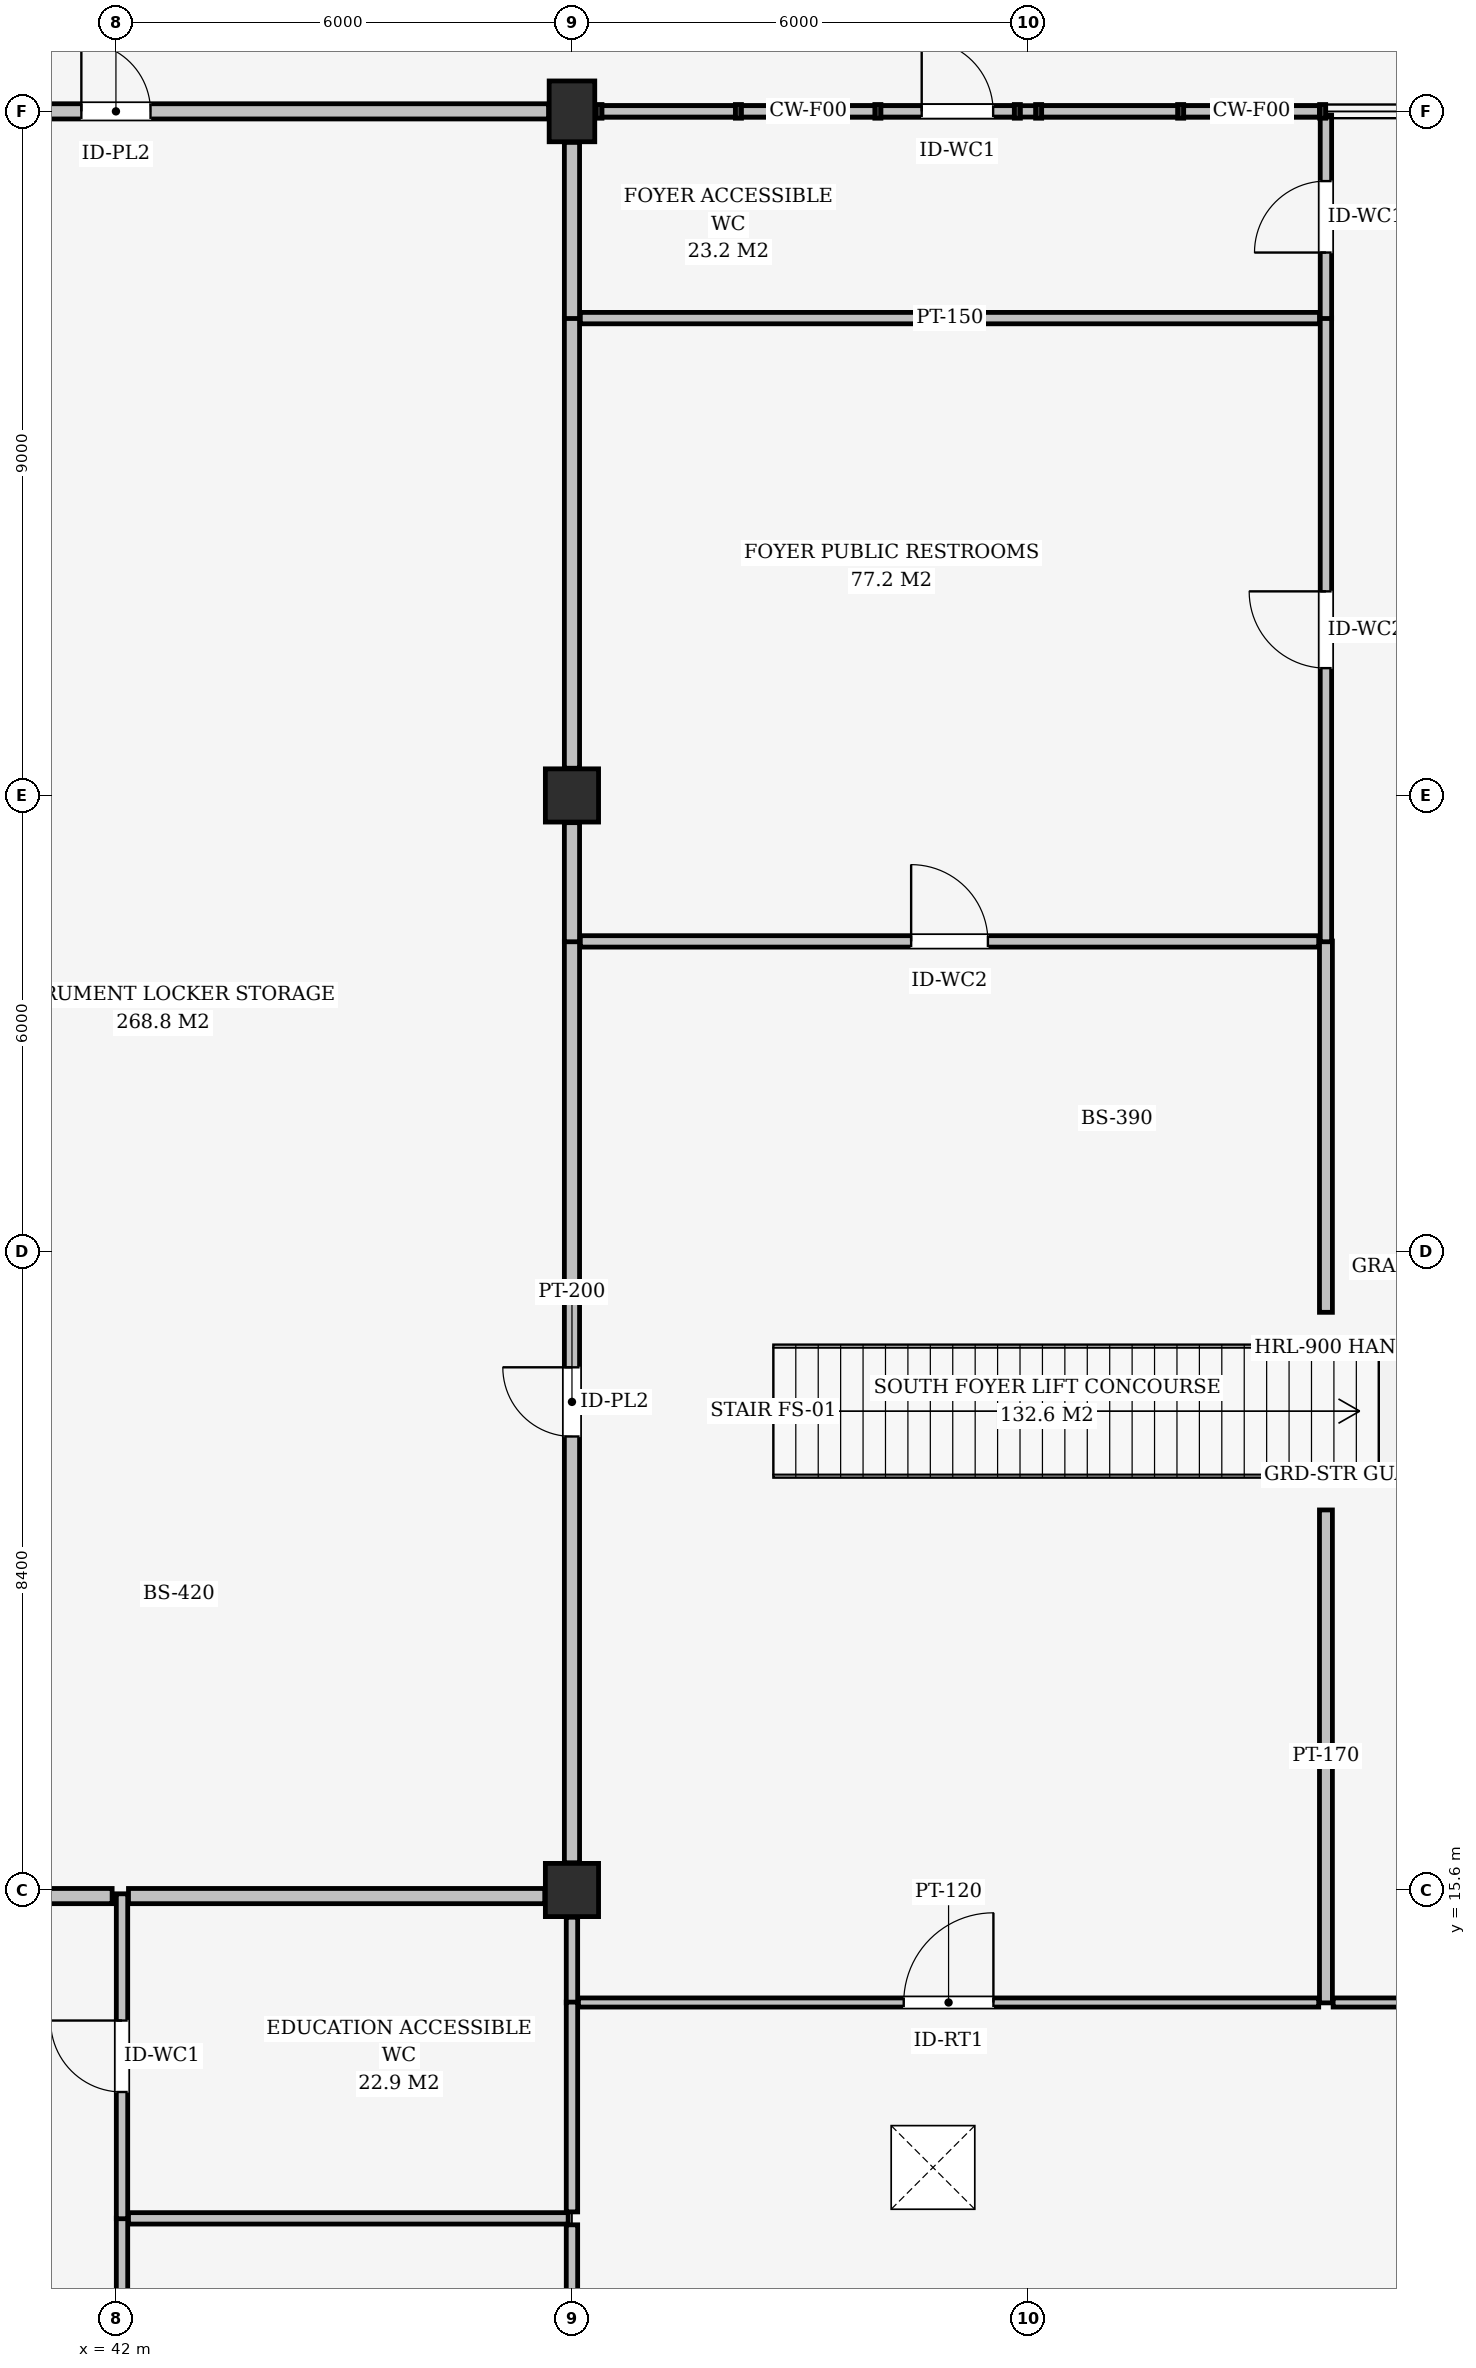
"""IFC4 building model, lengths in metres.
Left out: names, types, materials, properties, quantities, classifications, styles, units other than length and angle.
Written with IfcOpenShell. Run it as: python <this file> out.ifc"""

import sys

from ifc_helpers import new_model, si_unit, direction, frame, frame_2d, origin, origin_2d, place, context, subcontext, project, spatial, rectangle, extrude, element, fill, save


model = new_model("IFC4")
c1 = context("Model", 3, precision=1e-05, world=origin(), true_north=direction((0.0, 1.0)))
c2 = subcontext(c1, "Body", "Model", "MODEL_VIEW")
j1 = project(units=[si_unit("LENGTHUNIT", "METRE"), si_unit("PLANEANGLEUNIT", "RADIAN")], contexts=[c1])
p1 = place(None, origin())
s1 = spatial("IfcSite", under=j1, at=p1, CompositionType="ELEMENT")
p2 = place(p1, origin())
s2 = spatial("IfcBuilding", under=s1, at=p2, CompositionType="ELEMENT")
p3 = place(p2, origin())
s3 = spatial("IfcBuildingStorey", under=s2, at=p3, CompositionType="ELEMENT", Elevation=0.0)
p4 = place(p3, frame((48.0, 39.0, 0.0), z_axis=(0.0, 0.0, 1.0), x_axis=(1.0, 0.0, 0.0)))
e1 = element("IfcColumn", 1, at=p4, inside=s3, PredefinedType="COLUMN", context=c2, shape_type="SweptSolid", body=[
    extrude(rectangle(XDim=0.6, YDim=0.8, at=origin_2d()), origin(), (0.0, 0.0, 1.0), 4.8),
])
for number, where, z_axis, x_axis in (
    (2, (48.0, 15.6, 0.0), (0.0, 0.0, 1.0), (1.0, 0.0, 0.0)),
    (3, (48.0, 30.0, 0.0), (0.0, 0.0, 1.0), (1.0, 0.0, 0.0)),
):
    element("IfcColumn", number, at=place(p3, frame(where, z_axis=z_axis, x_axis=x_axis)), inside=s3, PredefinedType="COLUMN", context=c2, shape_type="SweptSolid", body=[
        extrude(rectangle(XDim=0.7, YDim=0.7, at=origin_2d()), origin(), (0.0, 0.0, 1.0), 4.8),
    ])
p5 = place(p3, frame((42.08, 0.05, 0.0), z_axis=(0.0, 0.0, 1.0), x_axis=(0.0, 1.0, 0.0)))
e4 = element("IfcWall", 4, at=p5, inside=s3, PredefinedType="PARTITIONING", context=c2, shape_type="SweptSolid", body=[
    extrude(rectangle(XDim=11.235, YDim=0.15, at=frame_2d((5.617, 0.0))), origin(), (0.0, 0.0, 1.0), 3.986),
])
p6 = place(p5, frame((6.596, 0.0, 0.0)))
e5 = element("IfcOpeningElement", 5, at=p6, cuts=e4, PredefinedType="OPENING", context=c2, shape_type="SweptSolid", body=[
    extrude(rectangle(XDim=1.01, YDim=2.1, at=frame_2d((0.505, 1.05))), frame((0.0, 0.085, 0.0), z_axis=(0.0, -1.0, 0.0), x_axis=(1.0, 0.0, 0.0)), (0.0, 0.0, 1.0), 0.17),
])
p7 = place(p3, frame((42.08, 11.275, 0.0), z_axis=(0.0, 0.0, 1.0), x_axis=(0.0, 1.0, 0.0)))
e6 = element("IfcWall", 6, at=p7, inside=s3, PredefinedType="PARTITIONING", context=c2, shape_type="SweptSolid", body=[
    extrude(rectangle(XDim=4.275, YDim=0.15, at=frame_2d((2.138, 0.0))), origin(), (0.0, 0.0, 1.0), 3.986),
])
p8 = place(p7, frame((1.667, 0.0, 0.0)))
e7 = element("IfcOpeningElement", 7, at=p8, cuts=e6, PredefinedType="OPENING", context=c2, shape_type="SweptSolid", body=[
    extrude(rectangle(XDim=0.94, YDim=2.1, at=frame_2d((0.47, 1.05))), frame((0.0, 0.085, 0.0), z_axis=(0.0, -1.0, 0.0), x_axis=(1.0, 0.0, 0.0)), (0.0, 0.0, 1.0), 0.17),
])
p9 = place(p3, frame((36.358, 15.52, 0.0), z_axis=(0.0, 0.0, 1.0), x_axis=(1.0, 0.0, 0.0)))
e8 = element("IfcWall", 8, at=p9, inside=s3, PredefinedType="PARTITIONING", context=c2, shape_type="SweptSolid", body=[
    extrude(rectangle(XDim=5.592, YDim=0.2, at=frame_2d((2.796, 0.0))), origin(), (0.0, 0.0, 1.0), 3.73),
])
p10 = place(p9, frame((2.341, 0.0, 0.0)))
e9 = element("IfcOpeningElement", 9, at=p10, cuts=e8, PredefinedType="OPENING", context=c2, shape_type="SweptSolid", body=[
    extrude(rectangle(XDim=0.91, YDim=2.1, at=frame_2d((0.455, 1.05))), frame((0.0, 0.11, 0.0), z_axis=(0.0, -1.0, 0.0), x_axis=(1.0, 0.0, 0.0)), (0.0, 0.0, 1.0), 0.22),
])
p11 = place(p3, frame((42.165, 11.28, 0.0), z_axis=(0.0, 0.0, 1.0), x_axis=(1.0, 0.0, 0.0)))
e10 = element("IfcWall", 10, at=p11, inside=s3, PredefinedType="PARTITIONING", context=c2, shape_type="SweptSolid", body=[
    extrude(rectangle(XDim=5.785, YDim=0.15, at=frame_2d((2.893, 0.0))), origin(), (0.0, 0.0, 1.0), 4.53),
])
p12 = place(p3, frame((48.0, 7.25, 0.0), z_axis=(0.0, 0.0, 1.0), x_axis=(0.0, 1.0, 0.0)))
e11 = element("IfcWall", 11, at=p12, inside=s3, PredefinedType="PARTITIONING", context=c2, shape_type="SweptSolid", body=[
    extrude(rectangle(XDim=3.945, YDim=0.15, at=frame_2d((1.973, 0.0))), origin(), (0.0, 0.0, 1.0), 3.684),
])
p13 = place(p3, frame((42.165, 15.52, 0.0), z_axis=(0.0, 0.0, 1.0), x_axis=(1.0, 0.0, 0.0)))
e12 = element("IfcWall", 12, at=p13, inside=s3, PredefinedType="PARTITIONING", context=c2, shape_type="SweptSolid", body=[
    extrude(rectangle(XDim=5.477, YDim=0.2, at=frame_2d((2.739, 0.0))), origin(), (0.0, 0.0, 1.0), 3.73),
])
p14 = place(p3, frame((48.0, 14.115, 0.0), z_axis=(0.0, 0.0, 1.0), x_axis=(0.0, 1.0, 0.0)))
e13 = element("IfcWall", 13, at=p14, inside=s3, PredefinedType="PARTITIONING", context=c2, shape_type="SweptSolid", body=[
    extrude(rectangle(XDim=1.127, YDim=0.15, at=frame_2d((0.563, 0.0))), origin(), (0.0, 0.0, 1.0), 3.684),
])
p15 = place(p3, frame((48.0, 11.365, 0.0), z_axis=(0.0, 0.0, 1.0), x_axis=(0.0, 1.0, 0.0)))
e14 = element("IfcWall", 14, at=p15, inside=s3, PredefinedType="PARTITIONING", context=c2, shape_type="SweptSolid", body=[
    extrude(rectangle(XDim=2.76, YDim=0.15, at=frame_2d((1.38, 0.0))), origin(), (0.0, 0.0, 1.0), 3.684),
])
p16 = place(p3, frame((48.0, 15.958, 0.0), z_axis=(0.0, 0.0, 1.0), x_axis=(0.0, 1.0, 0.0)))
e15 = element("IfcWall", 15, at=p16, inside=s3, PredefinedType="PARTITIONING", context=c2, shape_type="SweptSolid", body=[
    extrude(rectangle(XDim=12.127, YDim=0.2, at=frame_2d((6.063, 0.0))), origin(), (0.0, 0.0, 1.0), 3.919),
])
p17 = place(p16, frame((5.608, 0.0, 0.0)))
e16 = element("IfcOpeningElement", 16, at=p17, cuts=e15, PredefinedType="OPENING", context=c2, shape_type="SweptSolid", body=[
    extrude(rectangle(XDim=0.91, YDim=2.1, at=frame_2d((0.455, 1.05))), frame((0.0, 0.11, 0.0), z_axis=(0.0, -1.0, 0.0), x_axis=(1.0, 0.0, 0.0)), (0.0, 0.0, 1.0), 0.22),
])
p18 = place(p3, frame((48.0, 28.075, 0.0), z_axis=(0.0, 0.0, 1.0), x_axis=(0.0, 1.0, 0.0)))
e17 = element("IfcWall", 17, at=p18, inside=s3, PredefinedType="PARTITIONING", context=c2, shape_type="SweptSolid", body=[
    extrude(rectangle(XDim=1.567, YDim=0.2, at=frame_2d((0.784, 0.0))), origin(), (0.0, 0.0, 1.0), 3.919),
])
p19 = place(p3, frame((48.0, 30.358, 0.0), z_axis=(0.0, 0.0, 1.0), x_axis=(0.0, 1.0, 0.0)))
e18 = element("IfcWall", 18, at=p19, inside=s3, PredefinedType="PARTITIONING", context=c2, shape_type="SweptSolid", body=[
    extrude(rectangle(XDim=5.927, YDim=0.2, at=frame_2d((2.963, 0.0))), origin(), (0.0, 0.0, 1.0), 3.919),
])
p20 = place(p3, frame((48.0, 36.275, 0.0), z_axis=(0.0, 0.0, 1.0), x_axis=(0.0, 1.0, 0.0)))
e19 = element("IfcWall", 19, at=p20, inside=s3, PredefinedType="PARTITIONING", context=c2, shape_type="SweptSolid", body=[
    extrude(rectangle(XDim=2.317, YDim=0.2, at=frame_2d((1.159, 0.0))), origin(), (0.0, 0.0, 1.0), 3.919),
])
p21 = place(p3, frame((36.308, 39.0, 0.0), z_axis=(0.0, 0.0, 1.0), x_axis=(1.0, 0.0, 0.0)))
e20 = element("IfcWall", 20, at=p21, inside=s3, PredefinedType="PARTITIONING", context=c2, shape_type="SweptSolid", body=[
    extrude(rectangle(XDim=11.384, YDim=0.2, at=frame_2d((5.692, 0.0))), origin(), (0.0, 0.0, 1.0), 3.73),
])
p22 = place(p21, frame((5.237, 0.0, 0.0)))
e21 = element("IfcOpeningElement", 21, at=p22, cuts=e20, PredefinedType="OPENING", context=c2, shape_type="SweptSolid", body=[
    extrude(rectangle(XDim=0.91, YDim=2.1, at=frame_2d((0.455, 1.05))), frame((0.0, 0.11, 0.0), z_axis=(0.0, -1.0, 0.0), x_axis=(1.0, 0.0, 0.0)), (0.0, 0.0, 1.0), 0.22),
])
p23 = place(p3, frame((57.92, 14.115, 0.0), z_axis=(0.0, 0.0, 1.0), x_axis=(0.0, 1.0, 0.0)))
e22 = element("IfcWall", 22, at=p23, inside=s3, PredefinedType="PARTITIONING", context=c2, shape_type="SweptSolid", body=[
    extrude(rectangle(XDim=6.485, YDim=0.17, at=frame_2d((3.243, 0.0))), origin(), (0.0, 0.0, 1.0), 3.986),
])
p24 = place(p3, frame((57.92, 23.2, 0.0), z_axis=(0.0, 0.0, 1.0), x_axis=(0.0, 1.0, 0.0)))
e23 = element("IfcWall", 23, at=p24, inside=s3, PredefinedType="PARTITIONING", context=c2, shape_type="SweptSolid", body=[
    extrude(rectangle(XDim=4.885, YDim=0.17, at=frame_2d((2.442, 0.0))), origin(), (0.0, 0.0, 1.0), 4.53),
])
p25 = place(p3, frame((58.015, 14.12, 0.0), z_axis=(0.0, 0.0, 1.0), x_axis=(1.0, 0.0, 0.0)))
e24 = element("IfcWall", 24, at=p25, inside=s3, PredefinedType="PARTITIONING", context=c2, shape_type="SweptSolid", body=[
    extrude(rectangle(XDim=7.91, YDim=0.12, at=frame_2d((3.955, 0.0))), origin(), (0.0, 0.0, 1.0), 4.53),
])
p26 = place(p25, frame((3.365, 0.0, 0.0)))
e25 = element("IfcOpeningElement", 25, at=p26, cuts=e24, PredefinedType="OPENING", context=c2, shape_type="SweptSolid", body=[
    extrude(rectangle(XDim=1.18, YDim=2.2, at=frame_2d((0.59, 1.1))), frame((0.0, 0.07, 0.0), z_axis=(0.0, -1.0, 0.0), x_axis=(1.0, 0.0, 0.0)), (0.0, 0.0, 1.0), 0.14),
])
p27 = place(p3, frame((57.92, 28.075, 0.0), z_axis=(0.0, 0.0, 1.0), x_axis=(0.0, 1.0, 0.0)))
e26 = element("IfcWall", 26, at=p27, inside=s3, PredefinedType="PARTITIONING", context=c2, shape_type="SweptSolid", body=[
    extrude(rectangle(XDim=8.21, YDim=0.15, at=frame_2d((4.105, 0.0))), origin(), (0.0, 0.0, 1.0), 4.075),
])
p28 = place(p27, frame((3.6, 0.0, 0.0)))
e27 = element("IfcOpeningElement", 27, at=p28, cuts=e26, PredefinedType="OPENING", context=c2, shape_type="SweptSolid", body=[
    extrude(rectangle(XDim=1.01, YDim=2.1, at=frame_2d((0.505, 1.05))), frame((0.0, 0.085, 0.0), z_axis=(0.0, -1.0, 0.0), x_axis=(1.0, 0.0, 0.0)), (0.0, 0.0, 1.0), 0.17),
])
p29 = place(p3, frame((57.92, 36.275, 0.0), z_axis=(0.0, 0.0, 1.0), x_axis=(0.0, 1.0, 0.0)))
e28 = element("IfcWall", 28, at=p29, inside=s3, PredefinedType="PARTITIONING", context=c2, shape_type="SweptSolid", body=[
    extrude(rectangle(XDim=2.675, YDim=0.15, at=frame_2d((1.337, 0.0))), origin(), (0.0, 0.0, 1.0), 4.075),
])
p30 = place(p29, frame((0.867, 0.0, 0.0)))
e29 = element("IfcOpeningElement", 29, at=p30, cuts=e28, PredefinedType="OPENING", context=c2, shape_type="SweptSolid", body=[
    extrude(rectangle(XDim=0.94, YDim=2.1, at=frame_2d((0.47, 1.05))), frame((0.0, 0.085, 0.0), z_axis=(0.0, -1.0, 0.0), x_axis=(1.0, 0.0, 0.0)), (0.0, 0.0, 1.0), 0.17),
])
p31 = place(p3, frame((48.085, 14.12, 0.0), z_axis=(0.0, 0.0, 1.0), x_axis=(1.0, 0.0, 0.0)))
e30 = element("IfcWall", 30, at=p31, inside=s3, PredefinedType="PARTITIONING", context=c2, shape_type="SweptSolid", body=[
    extrude(rectangle(XDim=9.74, YDim=0.12, at=frame_2d((4.87, 0.0))), origin(), (0.0, 0.0, 1.0), 4.53),
])
p32 = place(p31, frame((4.28, 0.0, 0.0)))
e31 = element("IfcOpeningElement", 31, at=p32, cuts=e30, PredefinedType="OPENING", context=c2, shape_type="SweptSolid", body=[
    extrude(rectangle(XDim=1.18, YDim=2.2, at=frame_2d((0.59, 1.1))), frame((0.0, 0.07, 0.0), z_axis=(0.0, -1.0, 0.0), x_axis=(1.0, 0.0, 0.0)), (0.0, 0.0, 1.0), 0.14),
])
p33 = place(p3, frame((48.11, 28.08, 0.0), z_axis=(0.0, 0.0, 1.0), x_axis=(1.0, 0.0, 0.0)))
e32 = element("IfcWall", 32, at=p33, inside=s3, PredefinedType="PARTITIONING", context=c2, shape_type="SweptSolid", body=[
    extrude(rectangle(XDim=9.715, YDim=0.15, at=frame_2d((4.857, 0.0))), origin(), (0.0, 0.0, 1.0), 4.53),
])
p34 = place(p33, frame((4.353, 0.0, 0.0)))
e33 = element("IfcOpeningElement", 33, at=p34, cuts=e32, PredefinedType="OPENING", context=c2, shape_type="SweptSolid", body=[
    extrude(rectangle(XDim=1.01, YDim=2.1, at=frame_2d((0.505, 1.05))), frame((0.0, 0.085, 0.0), z_axis=(0.0, -1.0, 0.0), x_axis=(1.0, 0.0, 0.0)), (0.0, 0.0, 1.0), 0.17),
])
p35 = place(p3, frame((48.11, 36.28, 0.0), z_axis=(0.0, 0.0, 1.0), x_axis=(1.0, 0.0, 0.0)))
e34 = element("IfcWall", 34, at=p35, inside=s3, PredefinedType="PARTITIONING", context=c2, shape_type="SweptSolid", body=[
    extrude(rectangle(XDim=9.725, YDim=0.15, at=frame_2d((4.862, 0.0))), origin(), (0.0, 0.0, 1.0), 4.53),
])
p36 = place(p3, frame((48.308, 39.0, 0.0), z_axis=(0.0, 0.0, 1.0), x_axis=(1.0, 0.0, 0.0)))
e35 = element("IfcWall", 35, at=p36, inside=s3, PredefinedType="PARTITIONING", context=c2, shape_type="SweptSolid", body=[
    extrude(rectangle(XDim=9.527, YDim=0.15, at=frame_2d((4.763, 0.0))), origin(), (0.0, 0.0, 1.0), 3.73),
])
p37 = place(p36, frame((4.293, 0.0, 0.0)))
e36 = element("IfcOpeningElement", 36, at=p37, cuts=e35, PredefinedType="OPENING", context=c2, shape_type="SweptSolid", body=[
    extrude(rectangle(XDim=0.94, YDim=2.1, at=frame_2d((0.47, 1.05))), frame((0.0, 0.085, 0.0), z_axis=(0.0, -1.0, 0.0), x_axis=(1.0, 0.0, 0.0)), (0.0, 0.0, 1.0), 0.17),
])
p38 = place(p8, origin())
e37 = element("IfcDoor", 37, at=p38, inside=s3, OperationType="SINGLE_SWING_RIGHT", PredefinedType="DOOR", context=c2, shape_type="SweptSolid", body=[
    extrude(rectangle(XDim=0.94, YDim=2.1, at=frame_2d((0.47, 1.05))), frame((0.0, 0.025, 0.0), z_axis=(0.0, -1.0, 0.0), x_axis=(1.0, 0.0, 0.0)), (0.0, 0.0, 1.0), 0.05),
])
fill(e7, e37)
p39 = place(p17, origin())
e38 = element("IfcDoor", 38, at=p39, inside=s3, OperationType="SINGLE_SWING_RIGHT", PredefinedType="DOOR", context=c2, shape_type="SweptSolid", body=[
    extrude(rectangle(XDim=0.91, YDim=2.1, at=frame_2d((0.455, 1.05))), frame((0.0, 0.025, 0.0), z_axis=(0.0, -1.0, 0.0), x_axis=(1.0, 0.0, 0.0)), (0.0, 0.0, 1.0), 0.05),
])
fill(e16, e38)
p40 = place(p22, origin())
e39 = element("IfcDoor", 39, at=p40, inside=s3, OperationType="SINGLE_SWING_LEFT", PredefinedType="DOOR", context=c2, shape_type="SweptSolid", body=[
    extrude(rectangle(XDim=0.91, YDim=2.1, at=frame_2d((0.455, 1.05))), frame((0.0, 0.025, 0.0), z_axis=(0.0, -1.0, 0.0), x_axis=(1.0, 0.0, 0.0)), (0.0, 0.0, 1.0), 0.05),
])
fill(e21, e39)
p41 = place(p28, origin())
e40 = element("IfcDoor", 40, at=p41, inside=s3, OperationType="SINGLE_SWING_RIGHT", PredefinedType="DOOR", context=c2, shape_type="SweptSolid", body=[
    extrude(rectangle(XDim=1.01, YDim=2.1, at=frame_2d((0.505, 1.05))), frame((0.0, 0.025, 0.0), z_axis=(0.0, -1.0, 0.0), x_axis=(1.0, 0.0, 0.0)), (0.0, 0.0, 1.0), 0.05),
])
fill(e27, e40)
p42 = place(p30, origin())
e41 = element("IfcDoor", 41, at=p42, inside=s3, OperationType="SINGLE_SWING_LEFT", PredefinedType="DOOR", context=c2, shape_type="SweptSolid", body=[
    extrude(rectangle(XDim=0.94, YDim=2.1, at=frame_2d((0.47, 1.05))), frame((0.0, 0.025, 0.0), z_axis=(0.0, -1.0, 0.0), x_axis=(1.0, 0.0, 0.0)), (0.0, 0.0, 1.0), 0.05),
])
fill(e29, e41)
p43 = place(p32, origin())
e42 = element("IfcDoor", 42, at=p43, inside=s3, OperationType="SINGLE_SWING_RIGHT", PredefinedType="DOOR", context=c2, shape_type="SweptSolid", body=[
    extrude(rectangle(XDim=1.18, YDim=2.2, at=frame_2d((0.59, 1.1))), frame((0.0, 0.025, 0.0), z_axis=(0.0, -1.0, 0.0), x_axis=(1.0, 0.0, 0.0)), (0.0, 0.0, 1.0), 0.05),
])
fill(e31, e42)
p44 = place(p34, origin())
e43 = element("IfcDoor", 43, at=p44, inside=s3, OperationType="SINGLE_SWING_LEFT", PredefinedType="DOOR", context=c2, shape_type="SweptSolid", body=[
    extrude(rectangle(XDim=1.01, YDim=2.1, at=frame_2d((0.505, 1.05))), frame((0.0, 0.025, 0.0), z_axis=(0.0, -1.0, 0.0), x_axis=(1.0, 0.0, 0.0)), (0.0, 0.0, 1.0), 0.05),
])
fill(e33, e43)
p45 = place(p37, origin())
e44 = element("IfcDoor", 44, at=p45, inside=s3, OperationType="SINGLE_SWING_LEFT", PredefinedType="DOOR", context=c2, shape_type="SweptSolid", body=[
    extrude(rectangle(XDim=0.94, YDim=2.1, at=frame_2d((0.47, 1.05))), frame((0.0, 0.025, 0.0), z_axis=(0.0, -1.0, 0.0), x_axis=(1.0, 0.0, 0.0)), (0.0, 0.0, 1.0), 0.05),
])
fill(e36, e44)
save(model, sys.argv[1])
